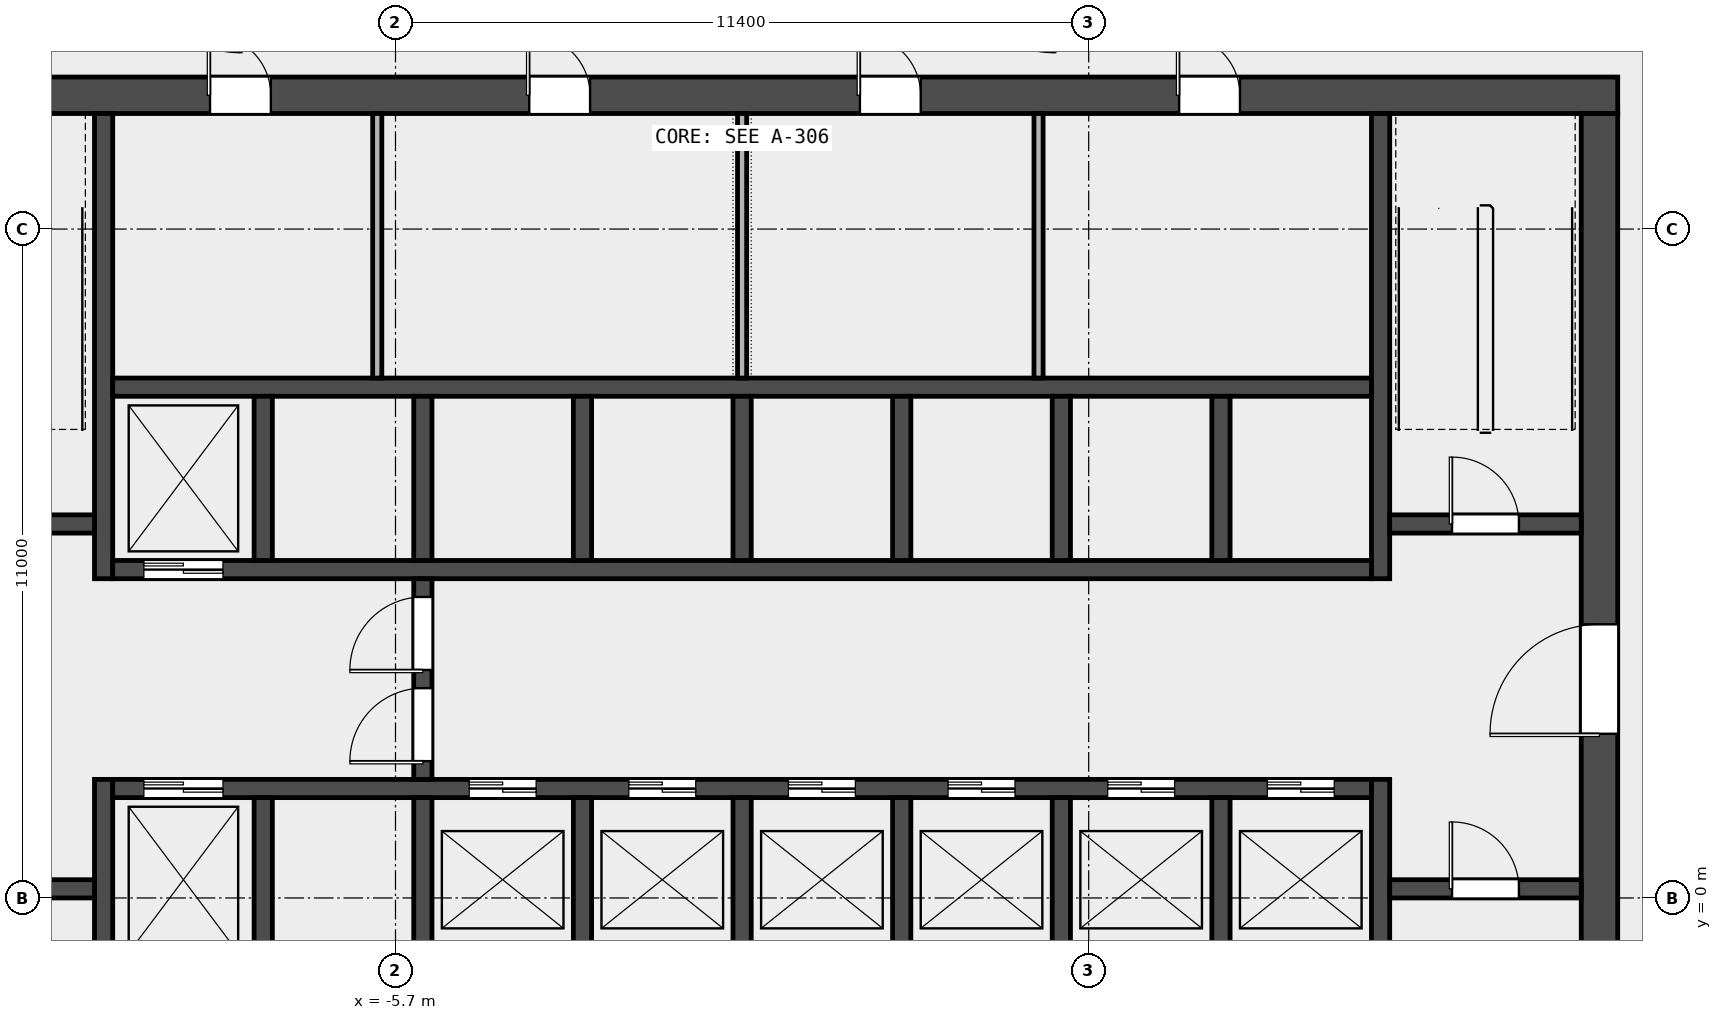
"""IFC4 building model, lengths in metres.
Left out: names, types, materials, properties, quantities, classifications, styles, units other than length and angle.
Written with IfcOpenShell. Run it as: python <this file> out.ifc"""

import sys

from ifc_helpers import new_model, si_unit, direction, frame, frame_2d, origin, place, context, subcontext, project, spatial, rectangle, extrude, element, fill, save


model = new_model("IFC4")
c1 = context("Model", 3, precision=1e-05, world=origin(), true_north=direction((0.0, 1.0)))
c2 = subcontext(c1, "Body", "Model", "MODEL_VIEW")
j1 = project(units=[si_unit("LENGTHUNIT", "METRE"), si_unit("PLANEANGLEUNIT", "RADIAN")], contexts=[c1])
p1 = place(None, origin())
s1 = spatial("IfcSite", under=j1, at=p1, CompositionType="ELEMENT")
p2 = place(p1, origin())
s2 = spatial("IfcBuilding", under=s1, at=p2, CompositionType="ELEMENT")
p3 = place(p2, frame((0.0, 0.0, 69.4)))
s3 = spatial("IfcBuildingStorey", under=s2, at=p3, CompositionType="ELEMENT", Elevation=69.4)
p4 = place(p3, frame((-14.4, 13.2, 0.0), z_axis=(0.0, 0.0, 1.0), x_axis=(1.0, 0.0, 0.0)))
e1 = element("IfcWall", 1, at=p4, inside=s3, PredefinedType="SHEAR", context=c2, shape_type="SweptSolid", body=[
    extrude(rectangle(XDim=28.8, YDim=0.6, at=frame_2d((14.4, 0.0))), origin(), (0.0, 0.0, 1.0), 4.5),
])
p5 = place(p4, frame((5.65, 0.0, 0.0)))
e2 = element("IfcOpeningElement", 2, at=p5, cuts=e1, PredefinedType="OPENING", context=c2, shape_type="SweptSolid", body=[
    extrude(rectangle(XDim=1.0, YDim=2.1, at=frame_2d((0.5, 1.05))), frame((0.0, 0.312, 0.0), z_axis=(0.0, -1.0, 0.0), x_axis=(1.0, 0.0, 0.0)), (0.0, 0.0, 1.0), 0.624),
])
p6 = place(p4, frame((10.9, 0.0, 0.0)))
e3 = element("IfcOpeningElement", 3, at=p6, cuts=e1, PredefinedType="OPENING", context=c2, shape_type="SweptSolid", body=[
    extrude(rectangle(XDim=1.0, YDim=2.1, at=frame_2d((0.5, 1.05))), frame((0.0, 0.312, 0.0), z_axis=(0.0, -1.0, 0.0), x_axis=(1.0, 0.0, 0.0)), (0.0, 0.0, 1.0), 0.624),
])
p7 = place(p4, frame((16.337, 0.0, 0.0)))
e4 = element("IfcOpeningElement", 4, at=p7, cuts=e1, PredefinedType="OPENING", context=c2, shape_type="SweptSolid", body=[
    extrude(rectangle(XDim=1.0, YDim=2.1, at=frame_2d((0.5, 1.05))), frame((0.0, 0.312, 0.0), z_axis=(0.0, -1.0, 0.0), x_axis=(1.0, 0.0, 0.0)), (0.0, 0.0, 1.0), 0.624),
])
p8 = place(p4, frame((21.587, 0.0, 0.0)))
e5 = element("IfcOpeningElement", 5, at=p8, cuts=e1, PredefinedType="OPENING", context=c2, shape_type="SweptSolid", body=[
    extrude(rectangle(XDim=1.0, YDim=2.1, at=frame_2d((0.5, 1.05))), frame((0.0, 0.312, 0.0), z_axis=(0.0, -1.0, 0.0), x_axis=(1.0, 0.0, 0.0)), (0.0, 0.0, 1.0), 0.624),
])
p9 = place(p3, frame((14.1, -6.6, 0.0), z_axis=(0.0, 0.0, 1.0), x_axis=(0.0, 1.0, 0.0)))
e6 = element("IfcWall", 6, at=p9, inside=s3, PredefinedType="SHEAR", context=c2, shape_type="SweptSolid", body=[
    extrude(rectangle(XDim=19.5, YDim=0.6, at=frame_2d((9.75, 0.0))), origin(), (0.0, 0.0, 1.0), 4.5),
])
p10 = place(p9, frame((9.3, 0.0, 0.0)))
e7 = element("IfcOpeningElement", 7, at=p10, cuts=e6, PredefinedType="OPENING", context=c2, shape_type="SweptSolid", body=[
    extrude(rectangle(XDim=1.8, YDim=2.1, at=frame_2d((0.9, 1.05))), frame((0.0, 0.312, 0.0), z_axis=(0.0, -1.0, 0.0), x_axis=(1.0, 0.0, 0.0)), (0.0, 0.0, 1.0), 0.624),
])
p11 = place(p3, frame((-10.5, -6.6, 0.0), z_axis=(0.0, 0.0, 1.0), x_axis=(0.0, 1.0, 0.0)))
e8 = element("IfcWall", 8, at=p11, inside=s3, PredefinedType="SHEAR", context=c2, shape_type="SweptSolid", body=[
    extrude(rectangle(XDim=8.55, YDim=0.3, at=frame_2d((4.275, 0.0))), origin(), (0.0, 0.0, 1.0), 4.5),
])
p12 = place(p3, frame((-10.5, 5.25, 0.0), z_axis=(0.0, 0.0, 1.0), x_axis=(0.0, 1.0, 0.0)))
e9 = element("IfcWall", 9, at=p12, inside=s3, PredefinedType="SHEAR", context=c2, shape_type="SweptSolid", body=[
    extrude(rectangle(XDim=7.65, YDim=0.3, at=frame_2d((3.825, 0.0))), origin(), (0.0, 0.0, 1.0), 4.5),
])
p13 = place(p3, frame((10.5, -6.6, 0.0), z_axis=(0.0, 0.0, 1.0), x_axis=(0.0, 1.0, 0.0)))
e10 = element("IfcWall", 10, at=p13, inside=s3, PredefinedType="SHEAR", context=c2, shape_type="SweptSolid", body=[
    extrude(rectangle(XDim=8.55, YDim=0.3, at=frame_2d((4.275, 0.0))), origin(), (0.0, 0.0, 1.0), 4.5),
])
p14 = place(p3, frame((10.5, 5.25, 0.0), z_axis=(0.0, 0.0, 1.0), x_axis=(0.0, 1.0, 0.0)))
e11 = element("IfcWall", 11, at=p14, inside=s3, PredefinedType="SHEAR", context=c2, shape_type="SweptSolid", body=[
    extrude(rectangle(XDim=7.65, YDim=0.3, at=frame_2d((3.825, 0.0))), origin(), (0.0, 0.0, 1.0), 4.5),
])
p15 = place(p3, frame((-13.8, 0.15, 0.0), z_axis=(0.0, 0.0, 1.0), x_axis=(1.0, 0.0, 0.0)))
e12 = element("IfcWall", 12, at=p15, inside=s3, PredefinedType="SOLIDWALL", context=c2, shape_type="SweptSolid", body=[
    extrude(rectangle(XDim=3.15, YDim=0.3, at=frame_2d((1.575, 0.0))), origin(), (0.0, 0.0, 1.0), 4.5),
])
p16 = place(p15, frame((0.975, 0.0, 0.0)))
e13 = element("IfcOpeningElement", 13, at=p16, cuts=e12, PredefinedType="OPENING", context=c2, shape_type="SweptSolid", body=[
    extrude(rectangle(XDim=1.1, YDim=2.1, at=frame_2d((0.55, 1.05))), frame((0.0, 0.162, 0.0), z_axis=(0.0, -1.0, 0.0), x_axis=(1.0, 0.0, 0.0)), (0.0, 0.0, 1.0), 0.324),
])
p17 = place(p3, frame((-13.8, 6.15, 0.0), z_axis=(0.0, 0.0, 1.0), x_axis=(1.0, 0.0, 0.0)))
e14 = element("IfcWall", 14, at=p17, inside=s3, PredefinedType="SOLIDWALL", context=c2, shape_type="SweptSolid", body=[
    extrude(rectangle(XDim=3.15, YDim=0.3, at=frame_2d((1.575, 0.0))), origin(), (0.0, 0.0, 1.0), 4.5),
])
p18 = place(p17, frame((0.975, 0.0, 0.0)))
e15 = element("IfcOpeningElement", 15, at=p18, cuts=e14, PredefinedType="OPENING", context=c2, shape_type="SweptSolid", body=[
    extrude(rectangle(XDim=1.1, YDim=2.1, at=frame_2d((0.55, 1.05))), frame((0.0, 0.162, 0.0), z_axis=(0.0, -1.0, 0.0), x_axis=(1.0, 0.0, 0.0)), (0.0, 0.0, 1.0), 0.324),
])
p19 = place(p3, frame((10.65, 0.15, 0.0), z_axis=(0.0, 0.0, 1.0), x_axis=(1.0, 0.0, 0.0)))
e16 = element("IfcWall", 16, at=p19, inside=s3, PredefinedType="SOLIDWALL", context=c2, shape_type="SweptSolid", body=[
    extrude(rectangle(XDim=3.15, YDim=0.3, at=frame_2d((1.575, 0.0))), origin(), (0.0, 0.0, 1.0), 4.5),
])
p20 = place(p19, frame((1.025, 0.0, 0.0)))
e17 = element("IfcOpeningElement", 17, at=p20, cuts=e16, PredefinedType="OPENING", context=c2, shape_type="SweptSolid", body=[
    extrude(rectangle(XDim=1.1, YDim=2.1, at=frame_2d((0.55, 1.05))), frame((0.0, 0.162, 0.0), z_axis=(0.0, -1.0, 0.0), x_axis=(1.0, 0.0, 0.0)), (0.0, 0.0, 1.0), 0.324),
])
p21 = place(p3, frame((10.65, 6.15, 0.0), z_axis=(0.0, 0.0, 1.0), x_axis=(1.0, 0.0, 0.0)))
e18 = element("IfcWall", 18, at=p21, inside=s3, PredefinedType="SOLIDWALL", context=c2, shape_type="SweptSolid", body=[
    extrude(rectangle(XDim=3.15, YDim=0.3, at=frame_2d((1.575, 0.0))), origin(), (0.0, 0.0, 1.0), 4.5),
])
p22 = place(p21, frame((1.025, 0.0, 0.0)))
e19 = element("IfcOpeningElement", 19, at=p22, cuts=e18, PredefinedType="OPENING", context=c2, shape_type="SweptSolid", body=[
    extrude(rectangle(XDim=1.1, YDim=2.1, at=frame_2d((0.55, 1.05))), frame((0.0, 0.162, 0.0), z_axis=(0.0, -1.0, 0.0), x_axis=(1.0, 0.0, 0.0)), (0.0, 0.0, 1.0), 0.324),
])
p23 = place(p3, frame((-10.35, 1.8, 0.0), z_axis=(0.0, 0.0, 1.0), x_axis=(1.0, 0.0, 0.0)))
e20 = element("IfcWall", 20, at=p23, inside=s3, PredefinedType="SOLIDWALL", context=c2, shape_type="SweptSolid", body=[
    extrude(rectangle(XDim=20.7, YDim=0.3, at=frame_2d((10.35, 0.0))), origin(), (0.0, 0.0, 1.0), 4.5),
])
p24 = place(p23, frame((0.512, 0.0, 0.0)))
e21 = element("IfcOpeningElement", 21, at=p24, cuts=e20, PredefinedType="OPENING", context=c2, shape_type="SweptSolid", body=[
    extrude(rectangle(XDim=1.3, YDim=2.1, at=frame_2d((0.65, 1.05))), frame((0.0, 0.162, 0.0), z_axis=(0.0, -1.0, 0.0), x_axis=(1.0, 0.0, 0.0)), (0.0, 0.0, 1.0), 0.324),
])
p25 = place(p23, frame((5.863, 0.0, 0.0)))
e22 = element("IfcOpeningElement", 22, at=p25, cuts=e20, PredefinedType="OPENING", context=c2, shape_type="SweptSolid", body=[
    extrude(rectangle(XDim=1.1, YDim=2.1, at=frame_2d((0.55, 1.05))), frame((0.0, 0.162, 0.0), z_axis=(0.0, -1.0, 0.0), x_axis=(1.0, 0.0, 0.0)), (0.0, 0.0, 1.0), 0.324),
])
p26 = place(p23, frame((8.488, 0.0, 0.0)))
e23 = element("IfcOpeningElement", 23, at=p26, cuts=e20, PredefinedType="OPENING", context=c2, shape_type="SweptSolid", body=[
    extrude(rectangle(XDim=1.1, YDim=2.1, at=frame_2d((0.55, 1.05))), frame((0.0, 0.162, 0.0), z_axis=(0.0, -1.0, 0.0), x_axis=(1.0, 0.0, 0.0)), (0.0, 0.0, 1.0), 0.324),
])
p27 = place(p23, frame((11.113, 0.0, 0.0)))
e24 = element("IfcOpeningElement", 24, at=p27, cuts=e20, PredefinedType="OPENING", context=c2, shape_type="SweptSolid", body=[
    extrude(rectangle(XDim=1.1, YDim=2.1, at=frame_2d((0.55, 1.05))), frame((0.0, 0.162, 0.0), z_axis=(0.0, -1.0, 0.0), x_axis=(1.0, 0.0, 0.0)), (0.0, 0.0, 1.0), 0.324),
])
p28 = place(p23, frame((13.738, 0.0, 0.0)))
e25 = element("IfcOpeningElement", 25, at=p28, cuts=e20, PredefinedType="OPENING", context=c2, shape_type="SweptSolid", body=[
    extrude(rectangle(XDim=1.1, YDim=2.1, at=frame_2d((0.55, 1.05))), frame((0.0, 0.162, 0.0), z_axis=(0.0, -1.0, 0.0), x_axis=(1.0, 0.0, 0.0)), (0.0, 0.0, 1.0), 0.324),
])
p29 = place(p23, frame((16.363, 0.0, 0.0)))
e26 = element("IfcOpeningElement", 26, at=p29, cuts=e20, PredefinedType="OPENING", context=c2, shape_type="SweptSolid", body=[
    extrude(rectangle(XDim=1.1, YDim=2.1, at=frame_2d((0.55, 1.05))), frame((0.0, 0.162, 0.0), z_axis=(0.0, -1.0, 0.0), x_axis=(1.0, 0.0, 0.0)), (0.0, 0.0, 1.0), 0.324),
])
p30 = place(p23, frame((18.988, 0.0, 0.0)))
e27 = element("IfcOpeningElement", 27, at=p30, cuts=e20, PredefinedType="OPENING", context=c2, shape_type="SweptSolid", body=[
    extrude(rectangle(XDim=1.1, YDim=2.1, at=frame_2d((0.55, 1.05))), frame((0.0, 0.162, 0.0), z_axis=(0.0, -1.0, 0.0), x_axis=(1.0, 0.0, 0.0)), (0.0, 0.0, 1.0), 0.324),
])
p31 = place(p3, frame((-10.35, 5.4, 0.0), z_axis=(0.0, 0.0, 1.0), x_axis=(1.0, 0.0, 0.0)))
e28 = element("IfcWall", 28, at=p31, inside=s3, PredefinedType="SOLIDWALL", context=c2, shape_type="SweptSolid", body=[
    extrude(rectangle(XDim=20.7, YDim=0.3, at=frame_2d((10.35, 0.0))), origin(), (0.0, 0.0, 1.0), 4.5),
])
p32 = place(p31, frame((0.512, 0.0, 0.0)))
e29 = element("IfcOpeningElement", 29, at=p32, cuts=e28, PredefinedType="OPENING", context=c2, shape_type="SweptSolid", body=[
    extrude(rectangle(XDim=1.3, YDim=2.1, at=frame_2d((0.65, 1.05))), frame((0.0, 0.162, 0.0), z_axis=(0.0, -1.0, 0.0), x_axis=(1.0, 0.0, 0.0)), (0.0, 0.0, 1.0), 0.324),
])
p33 = place(p3, frame((-10.35, 8.4, 0.0), z_axis=(0.0, 0.0, 1.0), x_axis=(1.0, 0.0, 0.0)))
e30 = element("IfcWall", 30, at=p33, inside=s3, PredefinedType="SOLIDWALL", context=c2, shape_type="SweptSolid", body=[
    extrude(rectangle(XDim=20.7, YDim=0.3, at=frame_2d((10.35, 0.0))), origin(), (0.0, 0.0, 1.0), 4.5),
])
for number, where, z_axis, x_axis in (
    (31, (-7.875, -1.05, 0.0), (0.0, 0.0, 1.0), (0.0, 1.0, 0.0)),
    (32, (-5.25, -1.05, 0.0), (0.0, 0.0, 1.0), (0.0, 1.0, 0.0)),
    (33, (-2.625, -1.05, 0.0), (0.0, 0.0, 1.0), (0.0, 1.0, 0.0)),
    (34, (0.0, -1.05, 0.0), (0.0, 0.0, 1.0), (0.0, 1.0, 0.0)),
    (35, (2.625, -1.05, 0.0), (0.0, 0.0, 1.0), (0.0, 1.0, 0.0)),
    (36, (5.25, -1.05, 0.0), (0.0, 0.0, 1.0), (0.0, 1.0, 0.0)),
    (37, (7.875, -1.05, 0.0), (0.0, 0.0, 1.0), (0.0, 1.0, 0.0)),
    (38, (-7.875, 5.55, 0.0), (0.0, 0.0, 1.0), (0.0, 1.0, 0.0)),
    (39, (-5.25, 5.55, 0.0), (0.0, 0.0, 1.0), (0.0, 1.0, 0.0)),
    (40, (-2.625, 5.55, 0.0), (0.0, 0.0, 1.0), (0.0, 1.0, 0.0)),
    (41, (0.0, 5.55, 0.0), (0.0, 0.0, 1.0), (0.0, 1.0, 0.0)),
    (42, (2.625, 5.55, 0.0), (0.0, 0.0, 1.0), (0.0, 1.0, 0.0)),
    (43, (5.25, 5.55, 0.0), (0.0, 0.0, 1.0), (0.0, 1.0, 0.0)),
    (44, (7.875, 5.55, 0.0), (0.0, 0.0, 1.0), (0.0, 1.0, 0.0)),
):
    element("IfcWall", number, at=place(p3, frame(where, z_axis=z_axis, x_axis=x_axis)), inside=s3, PredefinedType="SOLIDWALL", context=c2, shape_type="SweptSolid", body=[
        extrude(rectangle(XDim=2.7, YDim=0.3, at=frame_2d((1.35, 0.0))), origin(), (0.0, 0.0, 1.0), 4.5),
    ])
p34 = place(p3, frame((-5.25, 1.95, 0.0), z_axis=(0.0, 0.0, 1.0), x_axis=(0.0, 1.0, 0.0)))
e45 = element("IfcWall", 45, at=p34, inside=s3, PredefinedType="SOLIDWALL", context=c2, shape_type="SweptSolid", body=[
    extrude(rectangle(XDim=3.3, YDim=0.3, at=frame_2d((1.65, 0.0))), origin(), (0.0, 0.0, 1.0), 4.5),
])
p35 = place(p34, frame((0.3, 0.0, 0.0)))
e46 = element("IfcOpeningElement", 46, at=p35, cuts=e45, PredefinedType="OPENING", context=c2, shape_type="SweptSolid", body=[
    extrude(rectangle(XDim=1.2, YDim=2.1, at=frame_2d((0.6, 1.05))), frame((0.0, 0.162, 0.0), z_axis=(0.0, -1.0, 0.0), x_axis=(1.0, 0.0, 0.0)), (0.0, 0.0, 1.0), 0.324),
])
p36 = place(p34, frame((1.8, 0.0, 0.0)))
e47 = element("IfcOpeningElement", 47, at=p36, cuts=e45, PredefinedType="OPENING", context=c2, shape_type="SweptSolid", body=[
    extrude(rectangle(XDim=1.2, YDim=2.1, at=frame_2d((0.6, 1.05))), frame((0.0, 0.162, 0.0), z_axis=(0.0, -1.0, 0.0), x_axis=(1.0, 0.0, 0.0)), (0.0, 0.0, 1.0), 0.324),
])
for number, where, z_axis, x_axis in (
    (48, (-6.0, 8.55, 0.0), (0.0, 0.0, 1.0), (0.0, 1.0, 0.0)),
    (49, (0.0, 8.55, 0.0), (0.0, 0.0, 1.0), (0.0, 1.0, 0.0)),
    (50, (4.875, 8.55, 0.0), (0.0, 0.0, 1.0), (0.0, 1.0, 0.0)),
):
    element("IfcWall", number, at=place(p3, frame(where, z_axis=z_axis, x_axis=x_axis)), inside=s3, PredefinedType="PARTITIONING", context=c2, shape_type="SweptSolid", body=[
        extrude(rectangle(XDim=4.35, YDim=0.15, at=frame_2d((2.175, 0.0))), origin(), (0.0, 0.0, 1.0), 4.5),
    ])
p37 = place(p20, origin())
e51 = element("IfcDoor", 51, at=p37, inside=s3, OperationType="SINGLE_SWING_RIGHT", PredefinedType="DOOR", context=c2, shape_type="SweptSolid", body=[
    extrude(rectangle(XDim=1.1, YDim=2.1, at=frame_2d((0.55, 1.05))), frame((0.0, 0.025, 0.0), z_axis=(0.0, -1.0, 0.0), x_axis=(1.0, 0.0, 0.0)), (0.0, 0.0, 1.0), 0.05),
])
fill(e17, e51)
p38 = place(p22, origin())
e52 = element("IfcDoor", 52, at=p38, inside=s3, OperationType="SINGLE_SWING_RIGHT", PredefinedType="DOOR", context=c2, shape_type="SweptSolid", body=[
    extrude(rectangle(XDim=1.1, YDim=2.1, at=frame_2d((0.55, 1.05))), frame((0.0, 0.025, 0.0), z_axis=(0.0, -1.0, 0.0), x_axis=(1.0, 0.0, 0.0)), (0.0, 0.0, 1.0), 0.05),
])
fill(e19, e52)
p39 = place(p10, origin())
e53 = element("IfcDoor", 53, at=p39, inside=s3, OperationType="DOUBLE_DOOR_SINGLE_SWING", PredefinedType="DOOR", context=c2, shape_type="SweptSolid", body=[
    extrude(rectangle(XDim=1.8, YDim=2.1, at=frame_2d((0.9, 1.05))), frame((0.0, 0.025, 0.0), z_axis=(0.0, -1.0, 0.0), x_axis=(1.0, 0.0, 0.0)), (0.0, 0.0, 1.0), 0.05),
])
fill(e7, e53)
p40 = place(p35, origin())
e54 = element("IfcDoor", 54, at=p40, inside=s3, OperationType="SINGLE_SWING_LEFT", PredefinedType="DOOR", context=c2, shape_type="SweptSolid", body=[
    extrude(rectangle(XDim=1.2, YDim=2.1, at=frame_2d((0.6, 1.05))), frame((0.0, 0.025, 0.0), z_axis=(0.0, -1.0, 0.0), x_axis=(1.0, 0.0, 0.0)), (0.0, 0.0, 1.0), 0.05),
])
fill(e46, e54)
p41 = place(p36, origin())
e55 = element("IfcDoor", 55, at=p41, inside=s3, OperationType="SINGLE_SWING_RIGHT", PredefinedType="DOOR", context=c2, shape_type="SweptSolid", body=[
    extrude(rectangle(XDim=1.2, YDim=2.1, at=frame_2d((0.6, 1.05))), frame((0.0, 0.025, 0.0), z_axis=(0.0, -1.0, 0.0), x_axis=(1.0, 0.0, 0.0)), (0.0, 0.0, 1.0), 0.05),
])
fill(e47, e55)
p42 = place(p24, origin())
e56 = element("IfcDoor", 56, at=p42, inside=s3, OperationType="DOUBLE_DOOR_SLIDING", PredefinedType="DOOR", context=c2, shape_type="SweptSolid", body=[
    extrude(rectangle(XDim=1.3, YDim=2.1, at=frame_2d((0.65, 1.05))), frame((0.0, 0.025, 0.0), z_axis=(0.0, -1.0, 0.0), x_axis=(1.0, 0.0, 0.0)), (0.0, 0.0, 1.0), 0.05),
])
fill(e21, e56)
p43 = place(p25, origin())
e57 = element("IfcDoor", 57, at=p43, inside=s3, OperationType="DOUBLE_DOOR_SLIDING", PredefinedType="DOOR", context=c2, shape_type="SweptSolid", body=[
    extrude(rectangle(XDim=1.1, YDim=2.1, at=frame_2d((0.55, 1.05))), frame((0.0, 0.025, 0.0), z_axis=(0.0, -1.0, 0.0), x_axis=(1.0, 0.0, 0.0)), (0.0, 0.0, 1.0), 0.05),
])
fill(e22, e57)
p44 = place(p26, origin())
e58 = element("IfcDoor", 58, at=p44, inside=s3, OperationType="DOUBLE_DOOR_SLIDING", PredefinedType="DOOR", context=c2, shape_type="SweptSolid", body=[
    extrude(rectangle(XDim=1.1, YDim=2.1, at=frame_2d((0.55, 1.05))), frame((0.0, 0.025, 0.0), z_axis=(0.0, -1.0, 0.0), x_axis=(1.0, 0.0, 0.0)), (0.0, 0.0, 1.0), 0.05),
])
fill(e23, e58)
p45 = place(p27, origin())
e59 = element("IfcDoor", 59, at=p45, inside=s3, OperationType="DOUBLE_DOOR_SLIDING", PredefinedType="DOOR", context=c2, shape_type="SweptSolid", body=[
    extrude(rectangle(XDim=1.1, YDim=2.1, at=frame_2d((0.55, 1.05))), frame((0.0, 0.025, 0.0), z_axis=(0.0, -1.0, 0.0), x_axis=(1.0, 0.0, 0.0)), (0.0, 0.0, 1.0), 0.05),
])
fill(e24, e59)
p46 = place(p28, origin())
e60 = element("IfcDoor", 60, at=p46, inside=s3, OperationType="DOUBLE_DOOR_SLIDING", PredefinedType="DOOR", context=c2, shape_type="SweptSolid", body=[
    extrude(rectangle(XDim=1.1, YDim=2.1, at=frame_2d((0.55, 1.05))), frame((0.0, 0.025, 0.0), z_axis=(0.0, -1.0, 0.0), x_axis=(1.0, 0.0, 0.0)), (0.0, 0.0, 1.0), 0.05),
])
fill(e25, e60)
p47 = place(p29, origin())
e61 = element("IfcDoor", 61, at=p47, inside=s3, OperationType="DOUBLE_DOOR_SLIDING", PredefinedType="DOOR", context=c2, shape_type="SweptSolid", body=[
    extrude(rectangle(XDim=1.1, YDim=2.1, at=frame_2d((0.55, 1.05))), frame((0.0, 0.025, 0.0), z_axis=(0.0, -1.0, 0.0), x_axis=(1.0, 0.0, 0.0)), (0.0, 0.0, 1.0), 0.05),
])
fill(e26, e61)
p48 = place(p30, origin())
e62 = element("IfcDoor", 62, at=p48, inside=s3, OperationType="DOUBLE_DOOR_SLIDING", PredefinedType="DOOR", context=c2, shape_type="SweptSolid", body=[
    extrude(rectangle(XDim=1.1, YDim=2.1, at=frame_2d((0.55, 1.05))), frame((0.0, 0.025, 0.0), z_axis=(0.0, -1.0, 0.0), x_axis=(1.0, 0.0, 0.0)), (0.0, 0.0, 1.0), 0.05),
])
fill(e27, e62)
p49 = place(p32, origin())
e63 = element("IfcDoor", 63, at=p49, inside=s3, OperationType="DOUBLE_DOOR_SLIDING", PredefinedType="DOOR", context=c2, shape_type="SweptSolid", body=[
    extrude(rectangle(XDim=1.3, YDim=2.1, at=frame_2d((0.65, 1.05))), frame((0.0, 0.025, 0.0), z_axis=(0.0, -1.0, 0.0), x_axis=(1.0, 0.0, 0.0)), (0.0, 0.0, 1.0), 0.05),
])
fill(e29, e63)
p50 = place(p5, origin())
e64 = element("IfcDoor", 64, at=p50, inside=s3, OperationType="SINGLE_SWING_LEFT", PredefinedType="DOOR", context=c2, shape_type="SweptSolid", body=[
    extrude(rectangle(XDim=1.0, YDim=2.1, at=frame_2d((0.5, 1.05))), frame((0.0, 0.025, 0.0), z_axis=(0.0, -1.0, 0.0), x_axis=(1.0, 0.0, 0.0)), (0.0, 0.0, 1.0), 0.05),
])
fill(e2, e64)
p51 = place(p6, origin())
e65 = element("IfcDoor", 65, at=p51, inside=s3, OperationType="SINGLE_SWING_LEFT", PredefinedType="DOOR", context=c2, shape_type="SweptSolid", body=[
    extrude(rectangle(XDim=1.0, YDim=2.1, at=frame_2d((0.5, 1.05))), frame((0.0, 0.025, 0.0), z_axis=(0.0, -1.0, 0.0), x_axis=(1.0, 0.0, 0.0)), (0.0, 0.0, 1.0), 0.05),
])
fill(e3, e65)
p52 = place(p7, origin())
e66 = element("IfcDoor", 66, at=p52, inside=s3, OperationType="SINGLE_SWING_LEFT", PredefinedType="DOOR", context=c2, shape_type="SweptSolid", body=[
    extrude(rectangle(XDim=1.0, YDim=2.1, at=frame_2d((0.5, 1.05))), frame((0.0, 0.025, 0.0), z_axis=(0.0, -1.0, 0.0), x_axis=(1.0, 0.0, 0.0)), (0.0, 0.0, 1.0), 0.05),
])
fill(e4, e66)
p53 = place(p8, origin())
e67 = element("IfcDoor", 67, at=p53, inside=s3, OperationType="SINGLE_SWING_LEFT", PredefinedType="DOOR", context=c2, shape_type="SweptSolid", body=[
    extrude(rectangle(XDim=1.0, YDim=2.1, at=frame_2d((0.5, 1.05))), frame((0.0, 0.025, 0.0), z_axis=(0.0, -1.0, 0.0), x_axis=(1.0, 0.0, 0.0)), (0.0, 0.0, 1.0), 0.05),
])
fill(e5, e67)
save(model, sys.argv[1])
